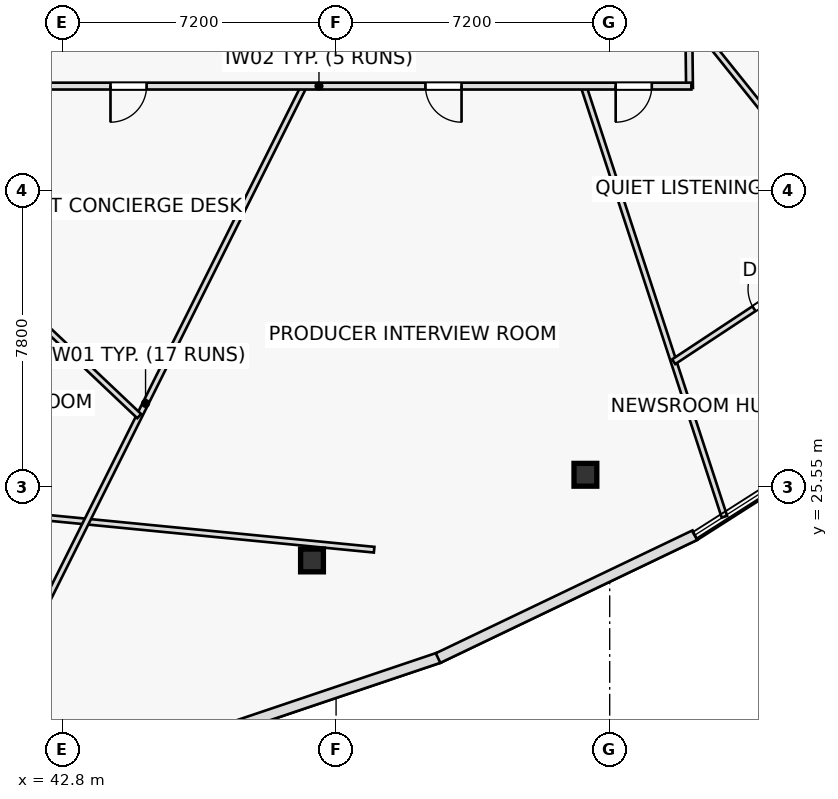
"""IFC4 building model, lengths in metres.
Left out: names, types, materials, properties, quantities, classifications, styles, units other than length and angle.
Written with IfcOpenShell. Run it as: python <this file> out.ifc"""

import sys

from ifc_helpers import new_model, si_unit, direction, frame, frame_2d, origin, origin_2d, place, context, subcontext, project, spatial, rectangle, hollow_rectangle, extrude, element, fill, save


model = new_model("IFC4")
c1 = context("Model", 3, precision=1e-05, world=origin(), true_north=direction((0.0, 1.0)))
c2 = subcontext(c1, "Body", "Model", "MODEL_VIEW")
j1 = project(units=[si_unit("LENGTHUNIT", "METRE"), si_unit("PLANEANGLEUNIT", "RADIAN")], contexts=[c1])
p1 = place(None, origin())
s1 = spatial("IfcSite", under=j1, at=p1, CompositionType="ELEMENT")
p2 = place(p1, origin())
s2 = spatial("IfcBuilding", under=s1, at=p2, CompositionType="ELEMENT")
p3 = place(p2, frame((0.0, 0.0, 184.9)))
s3 = spatial("IfcBuildingStorey", under=s2, at=p3, CompositionType="ELEMENT", Elevation=184.9)
for number, where, z_axis, x_axis in (
    (1, (49.366, 23.619, 0.0), (0.0, 0.0, 1.0), (1.0, 0.0, 0.0)),
    (2, (56.561, 25.873, 0.0), (0.0, 0.0, 1.0), (1.0, 0.0, 0.0)),
):
    element("IfcColumn", number, at=place(p3, frame(where, z_axis=z_axis, x_axis=x_axis)), inside=s3, PredefinedType="COLUMN", context=c2, shape_type="SweptSolid", body=[
        extrude(hollow_rectangle(XDim=0.6, YDim=0.6, WallThickness=0.036, at=origin_2d()), origin(), (0.0, 0.0, 1.0), 3.55),
    ])
p4 = place(p3, frame((39.589, 25.018, 0.0), z_axis=(0.0, 0.0, 1.0), x_axis=(0.99524905582, -0.097361783517, 0.0)))
e3 = element("IfcWall", 3, at=p4, inside=s3, PredefinedType="PARTITIONING", context=c2, shape_type="SweptSolid", body=[
    extrude(rectangle(XDim=11.467, YDim=0.15, at=frame_2d((5.733, 0.0))), origin(), (0.0, 0.0, 1.0), 2.935),
])
p5 = place(p3, frame((49.156, 36.1, 0.0), z_axis=(0.0, 0.0, 1.0), x_axis=(-0.446742672299, -0.894662497676, 0.0)))
e4 = element("IfcWall", 4, at=p5, inside=s3, PredefinedType="PARTITIONING", context=c2, shape_type="SweptSolid", body=[
    extrude(rectangle(XDim=18.666, YDim=0.15, at=frame_2d((9.333, 0.0))), origin(), (0.0, 0.0, 1.0), 2.935),
])
p6 = place(p3, frame((56.512, 36.1, 0.0), z_axis=(0.0, 0.0, 1.0), x_axis=(0.310939511527, -0.950429702909, 0.0)))
e5 = element("IfcWall", 5, at=p6, inside=s3, PredefinedType="PARTITIONING", context=c2, shape_type="SweptSolid", body=[
    extrude(rectangle(XDim=11.922, YDim=0.15, at=frame_2d((5.961, 0.0))), origin(), (0.0, 0.0, 1.0), 2.935),
])
p7 = place(p3, frame((59.278, 37.923, 0.0), z_axis=(0.0, 0.0, 1.0), x_axis=(0.625811087675, -0.779974667885, 0.0)))
e6 = element("IfcWall", 6, at=p7, inside=s3, PredefinedType="PARTITIONING", context=c2, shape_type="SweptSolid", body=[
    extrude(rectangle(XDim=11.545, YDim=0.15, at=frame_2d((5.772, 0.0))), origin(), (0.0, 0.0, 1.0), 2.935),
])
p8 = place(p3, frame((36.348, 35.439, 0.0), z_axis=(0.0, 0.0, 1.0), x_axis=(0.726094522042, -0.687594898949, 0.0)))
e7 = element("IfcWall", 7, at=p8, inside=s3, PredefinedType="PARTITIONING", context=c2, shape_type="SweptSolid", body=[
    extrude(rectangle(XDim=11.668, YDim=0.15, at=frame_2d((5.834, 0.0))), origin(), (0.0, 0.0, 1.0), 2.935),
])
p9 = place(p8, frame((5.359, 0.0, 0.0)))
e8 = element("IfcOpeningElement", 8, at=p9, cuts=e7, PredefinedType="OPENING", context=c2, shape_type="SweptSolid", body=[
    extrude(rectangle(XDim=0.95, YDim=2.05, at=frame_2d((0.475, 1.025))), frame((0.0, 0.085, 0.0), z_axis=(0.0, -1.0, 0.0), x_axis=(1.0, 0.0, 0.0)), (0.0, 0.0, 1.0), 0.17),
])
p10 = place(p3, frame((58.884, 28.848, 0.0), z_axis=(0.0, 0.0, 1.0), x_axis=(0.834609033184, 0.550842774054, 0.0)))
e9 = element("IfcWall", 9, at=p10, inside=s3, PredefinedType="PARTITIONING", context=c2, shape_type="SweptSolid", body=[
    extrude(rectangle(XDim=6.012, YDim=0.15, at=frame_2d((3.006, 0.0))), origin(), (0.0, 0.0, 1.0), 2.935),
])
p11 = place(p10, frame((2.531, 0.0, 0.0)))
e10 = element("IfcOpeningElement", 10, at=p11, cuts=e9, PredefinedType="OPENING", context=c2, shape_type="SweptSolid", body=[
    extrude(rectangle(XDim=0.95, YDim=2.05, at=frame_2d((0.475, 1.025))), frame((0.0, 0.085, 0.0), z_axis=(0.0, -1.0, 0.0), x_axis=(1.0, 0.0, 0.0)), (0.0, 0.0, 1.0), 0.17),
])
p12 = place(p3, frame((59.24, 41.1, 0.0), z_axis=(0.0, 0.0, 1.0), x_axis=(0.011891834917, -0.999929289631, 0.0)))
e11 = element("IfcWall", 11, at=p12, inside=s3, PredefinedType="PARTITIONING", context=c2, shape_type="SweptSolid", body=[
    extrude(rectangle(XDim=5.05, YDim=0.18, at=frame_2d((2.525, 0.0))), origin(), (0.0, 0.0, 1.0), 2.935),
])
p13 = place(p12, frame((1.305, 0.0, 0.0)))
e12 = element("IfcOpeningElement", 12, at=p13, cuts=e11, PredefinedType="OPENING", context=c2, shape_type="SweptSolid", body=[
    extrude(rectangle(XDim=0.95, YDim=2.05, at=frame_2d((0.475, 1.025))), frame((0.0, 0.1, 0.0), z_axis=(0.0, -1.0, 0.0), x_axis=(1.0, 0.0, 0.0)), (0.0, 0.0, 1.0), 0.2),
])
p14 = place(p3, frame((59.35, 36.1, 0.0), z_axis=(0.0, 0.0, 1.0), x_axis=(-1.0, 0.0, 0.0)))
e13 = element("IfcWall", 13, at=p14, inside=s3, PredefinedType="PARTITIONING", context=c2, shape_type="SweptSolid", body=[
    extrude(rectangle(XDim=19.6, YDim=0.18, at=frame_2d((9.8, 0.0))), origin(), (0.0, 0.0, 1.0), 2.935),
])
p15 = place(p14, frame((1.042, 0.0, 0.0)))
e14 = element("IfcOpeningElement", 14, at=p15, cuts=e13, PredefinedType="OPENING", context=c2, shape_type="SweptSolid", body=[
    extrude(rectangle(XDim=0.95, YDim=2.05, at=frame_2d((0.475, 1.025))), frame((0.0, 0.1, 0.0), z_axis=(0.0, -1.0, 0.0), x_axis=(1.0, 0.0, 0.0)), (0.0, 0.0, 1.0), 0.2),
])
p16 = place(p14, frame((6.048, 0.0, 0.0)))
e15 = element("IfcOpeningElement", 15, at=p16, cuts=e13, PredefinedType="OPENING", context=c2, shape_type="SweptSolid", body=[
    extrude(rectangle(XDim=0.95, YDim=2.05, at=frame_2d((0.475, 1.025))), frame((0.0, 0.1, 0.0), z_axis=(0.0, -1.0, 0.0), x_axis=(1.0, 0.0, 0.0)), (0.0, 0.0, 1.0), 0.2),
])
p17 = place(p14, frame((14.336, 0.0, 0.0)))
e16 = element("IfcOpeningElement", 16, at=p17, cuts=e13, PredefinedType="OPENING", context=c2, shape_type="SweptSolid", body=[
    extrude(rectangle(XDim=0.95, YDim=2.05, at=frame_2d((0.475, 1.025))), frame((0.0, 0.1, 0.0), z_axis=(0.0, -1.0, 0.0), x_axis=(1.0, 0.0, 0.0)), (0.0, 0.0, 1.0), 0.2),
])
p18 = place(p3, frame((45.603, 18.666, 0.0), z_axis=(0.0, 0.0, 1.0), x_axis=(0.947636650707, 0.31935055697, 0.0)))
e17 = element("IfcWall", 17, at=p18, inside=s3, PredefinedType="STANDARD", context=c2, shape_type="SweptSolid", body=[
    extrude(rectangle(XDim=7.501, YDim=0.28, at=frame_2d((3.75, 0.0))), origin(), (0.0, 0.0, 1.0), 3.55),
])
p19 = place(p3, frame((52.684, 21.05, 0.0), z_axis=(0.0, 0.0, 1.0), x_axis=(0.902032138124, 0.431668879804, 0.0)))
e18 = element("IfcWall", 18, at=p19, inside=s3, PredefinedType="STANDARD", context=c2, shape_type="SweptSolid", body=[
    extrude(rectangle(XDim=7.489, YDim=0.28, at=frame_2d((3.745, 0.0))), origin(), (0.0, 0.0, 1.0), 3.55),
])
p20 = place(p11, origin())
e19 = element("IfcDoor", 19, at=p20, inside=s3, OperationType="SINGLE_SWING_RIGHT", PredefinedType="DOOR", context=c2, shape_type="SweptSolid", body=[
    extrude(rectangle(XDim=0.95, YDim=2.05, at=frame_2d((0.475, 1.025))), frame((0.0, 0.025, 0.0), z_axis=(0.0, -1.0, 0.0), x_axis=(1.0, 0.0, 0.0)), (0.0, 0.0, 1.0), 0.05),
])
fill(e10, e19)
p21 = place(p15, origin())
e20 = element("IfcDoor", 20, at=p21, inside=s3, OperationType="SINGLE_SWING_RIGHT", PredefinedType="DOOR", context=c2, shape_type="SweptSolid", body=[
    extrude(rectangle(XDim=0.95, YDim=2.05, at=frame_2d((0.475, 1.025))), frame((0.0, 0.025, 0.0), z_axis=(0.0, -1.0, 0.0), x_axis=(1.0, 0.0, 0.0)), (0.0, 0.0, 1.0), 0.05),
])
fill(e14, e20)
p22 = place(p16, origin())
e21 = element("IfcDoor", 21, at=p22, inside=s3, OperationType="SINGLE_SWING_LEFT", PredefinedType="DOOR", context=c2, shape_type="SweptSolid", body=[
    extrude(rectangle(XDim=0.95, YDim=2.05, at=frame_2d((0.475, 1.025))), frame((0.0, 0.025, 0.0), z_axis=(0.0, -1.0, 0.0), x_axis=(1.0, 0.0, 0.0)), (0.0, 0.0, 1.0), 0.05),
])
fill(e15, e21)
p23 = place(p17, origin())
e22 = element("IfcDoor", 22, at=p23, inside=s3, OperationType="SINGLE_SWING_RIGHT", PredefinedType="DOOR", context=c2, shape_type="SweptSolid", body=[
    extrude(rectangle(XDim=0.95, YDim=2.05, at=frame_2d((0.475, 1.025))), frame((0.0, 0.025, 0.0), z_axis=(0.0, -1.0, 0.0), x_axis=(1.0, 0.0, 0.0)), (0.0, 0.0, 1.0), 0.05),
])
fill(e16, e22)
save(model, sys.argv[1])
